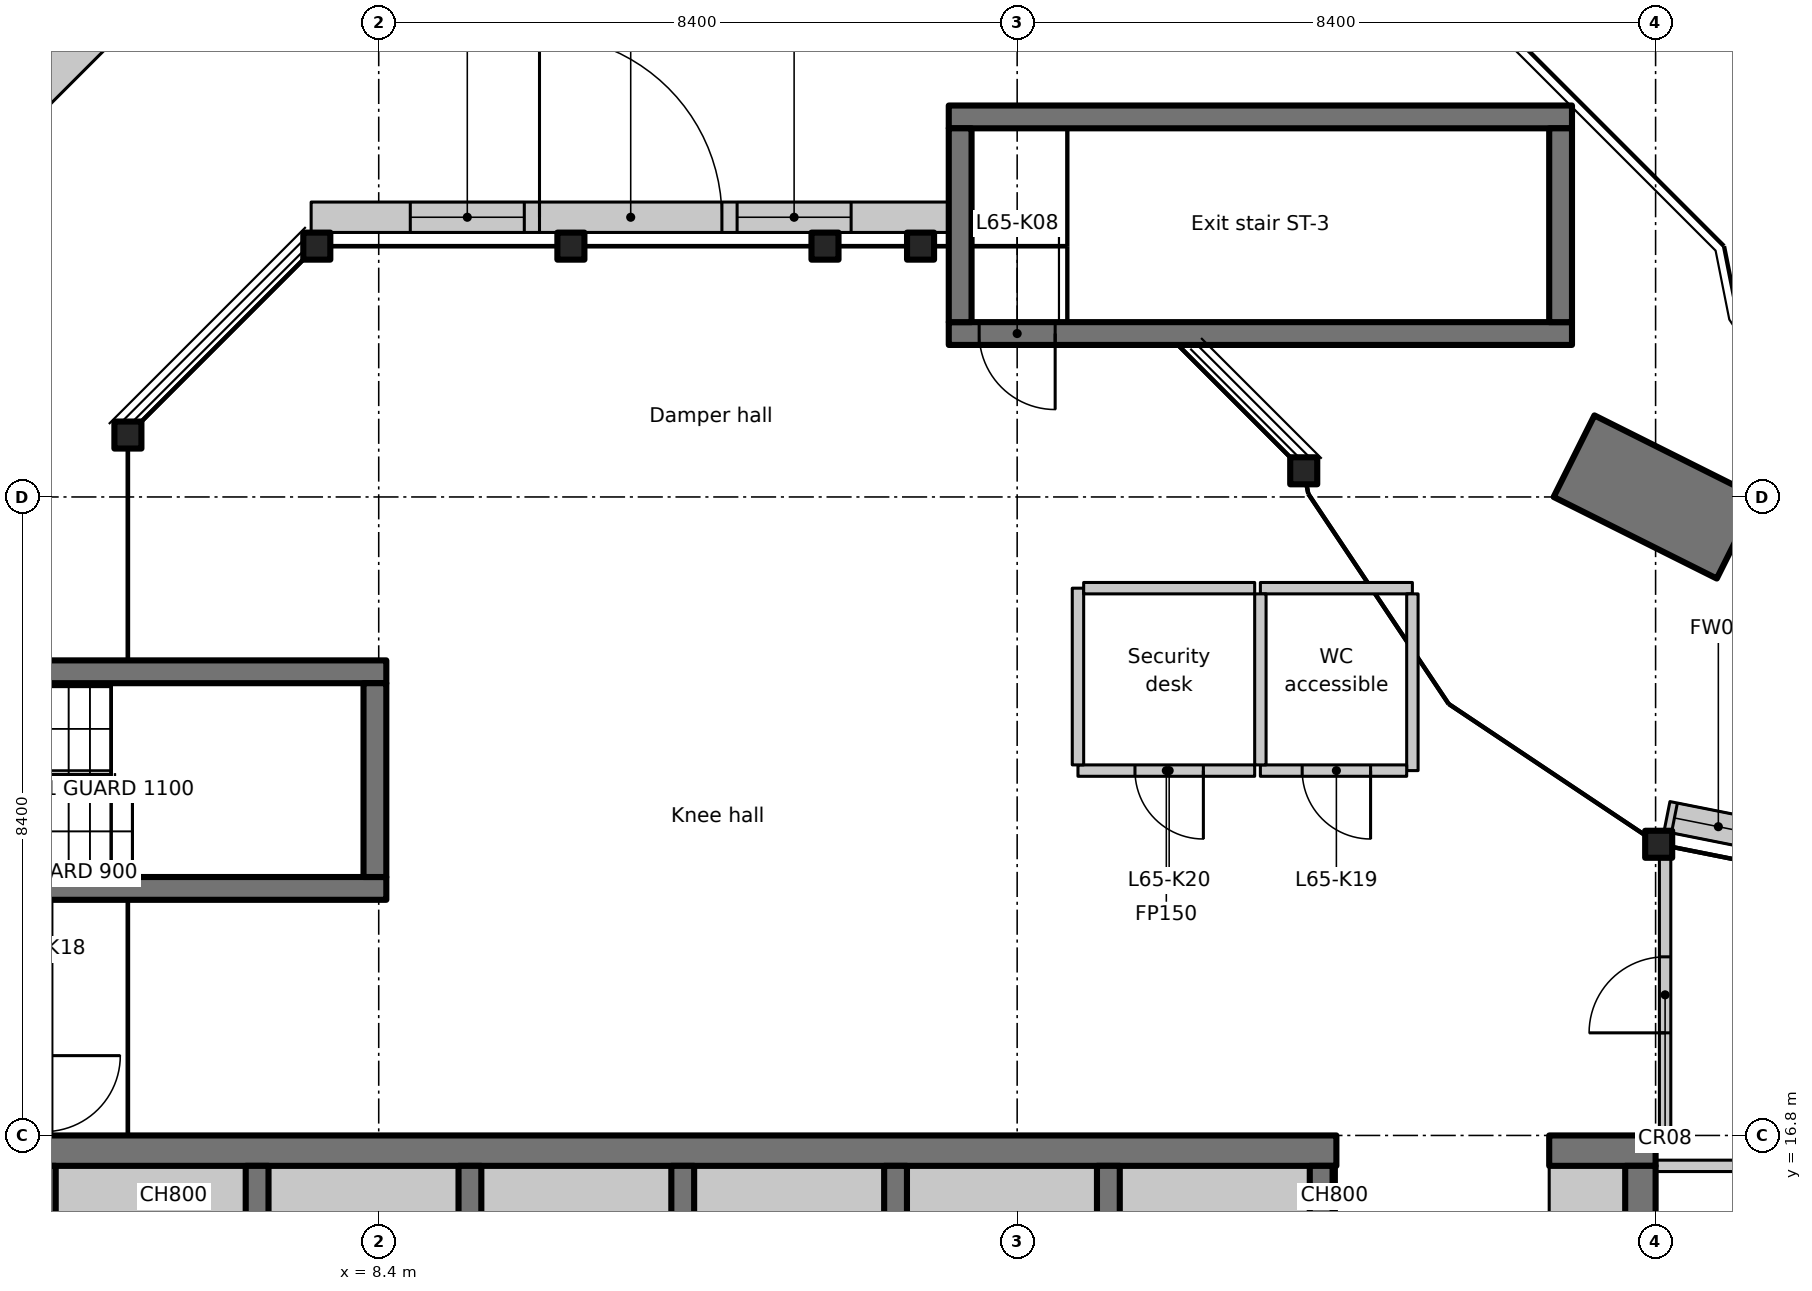
"""IFC4 building model, lengths in metres.
Left out: names, types, materials, properties, quantities, classifications, styles, units other than length and angle.
Written with IfcOpenShell. Run it as: python <this file> out.ifc"""

import sys

from ifc_helpers import new_model, si_unit, direction, frame, frame_2d, origin, origin_2d, place, context, subcontext, project, spatial, rectangle, hollow_circle, extrude, element, fill, save


model = new_model("IFC4")
c1 = context("Model", 3, precision=1e-05, world=origin(), true_north=direction((0.0, 1.0)))
c2 = subcontext(c1, "Body", "Model", "MODEL_VIEW")
j1 = project(units=[si_unit("LENGTHUNIT", "METRE"), si_unit("PLANEANGLEUNIT", "RADIAN")], contexts=[c1])
p1 = place(None, origin())
s1 = spatial("IfcSite", under=j1, at=p1, CompositionType="ELEMENT")
p2 = place(p1, origin())
s2 = spatial("IfcBuilding", under=s1, at=p2, CompositionType="ELEMENT")
p3 = place(p2, frame((0.0, 0.0, 256.2)))
s3 = spatial("IfcBuildingStorey", under=s2, at=p3, CompositionType="ELEMENT", Elevation=256.2)
p4 = place(p3, frame((26.273, 24.663, 0.0), z_axis=(0.0, 0.0, 1.0), x_axis=(-0.894427191, 0.4472135955, 0.0)))
e1 = element("IfcWall", 1, at=p4, inside=s3, PredefinedType="SOLIDWALL", context=c2, shape_type="SweptSolid", body=[
    extrude(rectangle(XDim=2.4, YDim=1.2, at=frame_2d((1.2, 0.0))), origin(), (0.0, 0.0, 1.0), 8.0),
])
for number, where, z_axis, x_axis in (
    (2, (5.1, 26.015, 0.0), (0.0, 0.0, 1.0), (1.0, 0.0, 0.0)),
    (3, (7.585, 28.5, 0.0), (0.0, 0.0, 1.0), (1.0, 0.0, 0.0)),
    (4, (10.928, 28.5, 0.0), (0.0, 0.0, 1.0), (1.0, 0.0, 0.0)),
    (5, (14.271, 28.5, 0.0), (0.0, 0.0, 1.0), (1.0, 0.0, 0.0)),
    (6, (15.529, 28.5, 0.0), (0.0, 0.0, 1.0), (1.0, 0.0, 0.0)),
    (7, (20.57, 25.544, 0.0), (0.0, 0.0, 1.0), (1.0, 0.0, 0.0)),
    (8, (25.24, 20.631, 0.0), (0.0, 0.0, 1.0), (1.0, 0.0, 0.0)),
):
    element("IfcColumn", number, at=place(p3, frame(where, z_axis=z_axis, x_axis=x_axis)), inside=s3, PredefinedType="COLUMN", context=c2, shape_type="SweptSolid", body=[
        extrude(hollow_circle(Radius=0.178, WallThickness=0.012, at=origin_2d()), origin(), (0.0, 0.0, 1.0), 7.7),
    ])
p5 = place(p3, frame((-1.1, 16.6, 0.0), z_axis=(0.0, 0.0, 1.0), x_axis=(1.0, 0.0, 0.0)))
e9 = element("IfcWall", 9, at=p5, inside=s3, PredefinedType="SHEAR", context=c2, shape_type="SweptSolid", body=[
    extrude(rectangle(XDim=22.1, YDim=0.4, at=frame_2d((11.05, 0.0))), origin(), (0.0, 0.0, 1.0), 7.7),
])
p6 = place(p5, frame((3.15, 0.0, 0.0)))
e10 = element("IfcOpeningElement", 10, at=p6, cuts=e9, PredefinedType="OPENING", context=c2, shape_type="SweptSolid", body=[
    extrude(rectangle(XDim=1.1, YDim=2.3, at=frame_2d((0.55, 1.15))), frame((0.0, 0.21, 0.0), z_axis=(0.0, -1.0, 0.0), x_axis=(1.0, 0.0, 0.0)), (0.0, 0.0, 1.0), 0.42),
])
p7 = place(p3, frame((23.8, 16.6, 0.0), z_axis=(0.0, 0.0, 1.0), x_axis=(1.0, 0.0, 0.0)))
e11 = element("IfcWall", 11, at=p7, inside=s3, PredefinedType="SHEAR", context=c2, shape_type="SweptSolid", body=[
    extrude(rectangle(XDim=1.4, YDim=0.4, at=frame_2d((0.7, 0.0))), origin(), (0.0, 0.0, 1.0), 7.7),
])
p8 = place(p3, frame((25.0, 12.6, 0.0), z_axis=(0.0, 0.0, 1.0), x_axis=(0.0, 1.0, 0.0)))
e12 = element("IfcWall", 12, at=p8, inside=s3, PredefinedType="SHEAR", context=c2, shape_type="SweptSolid", body=[
    extrude(rectangle(XDim=3.8, YDim=0.4, at=frame_2d((1.9, 0.0))), origin(), (0.0, 0.0, 1.0), 7.7),
])
p9 = place(p3, frame((23.8, 16.0, 0.0), z_axis=(0.0, 0.0, 1.0), x_axis=(1.0, 0.0, 0.0)))
e13 = element("IfcWall", 13, at=p9, inside=s3, PredefinedType="PARTITIONING", context=c2, shape_type="SweptSolid", body=[
    extrude(rectangle(XDim=1.0, YDim=0.8, at=frame_2d((0.5, 0.0))), origin(), (0.0, 0.0, 1.0), 7.7),
])
for number, where, z_axis, x_axis in (
    (14, (4.0, 12.95, 0.0), (0.0, 0.0, 1.0), (0.0, 1.0, 0.0)),
    (15, (6.8, 12.95, 0.0), (0.0, 0.0, 1.0), (0.0, 1.0, 0.0)),
    (16, (9.6, 12.95, 0.0), (0.0, 0.0, 1.0), (0.0, 1.0, 0.0)),
    (17, (12.4, 12.95, 0.0), (0.0, 0.0, 1.0), (0.0, 1.0, 0.0)),
    (18, (15.2, 12.95, 0.0), (0.0, 0.0, 1.0), (0.0, 1.0, 0.0)),
    (19, (18.0, 12.95, 0.0), (0.0, 0.0, 1.0), (0.0, 1.0, 0.0)),
    (20, (20.8, 12.95, 0.0), (0.0, 0.0, 1.0), (0.0, 1.0, 0.0)),
):
    element("IfcWall", number, at=place(p3, frame(where, z_axis=z_axis, x_axis=x_axis)), inside=s3, PredefinedType="SHEAR", context=c2, shape_type="SweptSolid", body=[
        extrude(rectangle(XDim=3.45, YDim=0.3, at=frame_2d((1.725, 0.0))), origin(), (0.0, 0.0, 1.0), 7.7),
    ])
p10 = place(p3, frame((8.5, 20.05, 0.0), z_axis=(0.0, 0.0, 1.0), x_axis=(-1.0, 0.0, 0.0)))
e21 = element("IfcWall", 21, at=p10, inside=s3, PredefinedType="SHEAR", context=c2, shape_type="SweptSolid", body=[
    extrude(rectangle(XDim=8.2, YDim=0.3, at=frame_2d((4.1, 0.0))), origin(), (0.0, 0.0, 1.0), 7.7),
])
p11 = place(p10, frame((6.8, 0.0, 0.0)))
e22 = element("IfcOpeningElement", 22, at=p11, cuts=e21, PredefinedType="OPENING", context=c2, shape_type="SweptSolid", body=[
    extrude(rectangle(XDim=1.0, YDim=2.1, at=frame_2d((0.5, 1.05))), frame((0.0, 0.16, 0.0), z_axis=(0.0, -1.0, 0.0), x_axis=(1.0, 0.0, 0.0)), (0.0, 0.0, 1.0), 0.32),
])
p12 = place(p3, frame((0.3, 22.9, 0.0), z_axis=(0.0, 0.0, 1.0), x_axis=(1.0, 0.0, 0.0)))
e23 = element("IfcWall", 23, at=p12, inside=s3, PredefinedType="SHEAR", context=c2, shape_type="SweptSolid", body=[
    extrude(rectangle(XDim=8.2, YDim=0.3, at=frame_2d((4.1, 0.0))), origin(), (0.0, 0.0, 1.0), 7.7),
])
p13 = place(p12, frame((0.4, 0.0, 0.0)))
e24 = element("IfcOpeningElement", 24, at=p13, cuts=e23, PredefinedType="OPENING", context=c2, shape_type="SweptSolid", body=[
    extrude(rectangle(XDim=1.0, YDim=2.1, at=frame_2d((0.5, 1.05))), frame((0.0, 0.16, 0.0), z_axis=(0.0, -1.0, 0.0), x_axis=(1.0, 0.0, 0.0)), (0.0, 0.0, 1.0), 0.32),
])
p14 = place(p3, frame((8.35, 20.2, 0.0), z_axis=(0.0, 0.0, 1.0), x_axis=(0.0, 1.0, 0.0)))
e25 = element("IfcWall", 25, at=p14, inside=s3, PredefinedType="SHEAR", context=c2, shape_type="SweptSolid", body=[
    extrude(rectangle(XDim=2.55, YDim=0.3, at=frame_2d((1.275, 0.0))), origin(), (0.0, 0.0, 1.0), 7.7),
])
p15 = place(p3, frame((24.1, 27.35, 0.0), z_axis=(0.0, 0.0, 1.0), x_axis=(-1.0, 0.0, 0.0)))
e26 = element("IfcWall", 26, at=p15, inside=s3, PredefinedType="SHEAR", context=c2, shape_type="SweptSolid", body=[
    extrude(rectangle(XDim=8.2, YDim=0.3, at=frame_2d((4.1, 0.0))), origin(), (0.0, 0.0, 1.0), 3.2),
])
p16 = place(p15, frame((6.8, 0.0, 0.0)))
e27 = element("IfcOpeningElement", 27, at=p16, cuts=e26, PredefinedType="OPENING", context=c2, shape_type="SweptSolid", body=[
    extrude(rectangle(XDim=1.0, YDim=2.1, at=frame_2d((0.5, 1.05))), frame((0.0, 0.16, 0.0), z_axis=(0.0, -1.0, 0.0), x_axis=(1.0, 0.0, 0.0)), (0.0, 0.0, 1.0), 0.32),
])
p17 = place(p3, frame((15.9, 30.2, 0.0), z_axis=(0.0, 0.0, 1.0), x_axis=(1.0, 0.0, 0.0)))
e28 = element("IfcWall", 28, at=p17, inside=s3, PredefinedType="SHEAR", context=c2, shape_type="SweptSolid", body=[
    extrude(rectangle(XDim=8.2, YDim=0.3, at=frame_2d((4.1, 0.0))), origin(), (0.0, 0.0, 1.0), 3.2),
])
for number, where, z_axis, x_axis in (
    (29, (16.05, 27.5, 0.0), (0.0, 0.0, 1.0), (0.0, 1.0, 0.0)),
    (30, (23.95, 27.5, 0.0), (0.0, 0.0, 1.0), (0.0, 1.0, 0.0)),
):
    element("IfcWall", number, at=place(p3, frame(where, z_axis=z_axis, x_axis=x_axis)), inside=s3, PredefinedType="SHEAR", context=c2, shape_type="SweptSolid", body=[
        extrude(rectangle(XDim=2.55, YDim=0.3, at=frame_2d((1.275, 0.0))), origin(), (0.0, 0.0, 1.0), 3.2),
    ])
p18 = place(p3, frame((20.0, 24.0, 0.0), z_axis=(0.0, 0.0, 1.0), x_axis=(1.0, 0.0, 0.0)))
e31 = element("IfcWall", 31, at=p18, inside=s3, PredefinedType="PARTITIONING", context=c2, shape_type="SweptSolid", body=[
    extrude(rectangle(XDim=2.0, YDim=0.15, at=frame_2d((1.0, 0.0))), origin(), (0.0, 0.0, 1.0), 7.7),
])
p19 = place(p3, frame((22.0, 23.925, 0.0), z_axis=(0.0, 0.0, 1.0), x_axis=(0.0, -1.0, 0.0)))
e32 = element("IfcWall", 32, at=p19, inside=s3, PredefinedType="PARTITIONING", context=c2, shape_type="SweptSolid", body=[
    extrude(rectangle(XDim=2.325, YDim=0.15, at=frame_2d((1.163, 0.0))), origin(), (0.0, 0.0, 1.0), 7.7),
])
p20 = place(p3, frame((21.925, 21.6, 0.0), z_axis=(0.0, 0.0, 1.0), x_axis=(-1.0, 0.0, 0.0)))
e33 = element("IfcWall", 33, at=p20, inside=s3, PredefinedType="PARTITIONING", context=c2, shape_type="SweptSolid", body=[
    extrude(rectangle(XDim=1.925, YDim=0.15, at=frame_2d((0.962, 0.0))), origin(), (0.0, 0.0, 1.0), 7.7),
])
p21 = place(p20, frame((0.475, 0.0, 0.0)))
e34 = element("IfcOpeningElement", 34, at=p21, cuts=e33, PredefinedType="OPENING", context=c2, shape_type="SweptSolid", body=[
    extrude(rectangle(XDim=0.9, YDim=2.1, at=frame_2d((0.45, 1.05))), frame((0.0, 0.085, 0.0), z_axis=(0.0, -1.0, 0.0), x_axis=(1.0, 0.0, 0.0)), (0.0, 0.0, 1.0), 0.17),
])
p22 = place(p3, frame((20.0, 21.675, 0.0), z_axis=(0.0, 0.0, 1.0), x_axis=(0.0, 1.0, 0.0)))
e35 = element("IfcWall", 35, at=p22, inside=s3, PredefinedType="PARTITIONING", context=c2, shape_type="SweptSolid", body=[
    extrude(rectangle(XDim=2.25, YDim=0.15, at=frame_2d((1.125, 0.0))), origin(), (0.0, 0.0, 1.0), 7.7),
])
p23 = place(p3, frame((19.925, 21.6, 0.0), z_axis=(0.0, 0.0, 1.0), x_axis=(-1.0, 0.0, 0.0)))
e36 = element("IfcWall", 36, at=p23, inside=s3, PredefinedType="PARTITIONING", context=c2, shape_type="SweptSolid", body=[
    extrude(rectangle(XDim=2.325, YDim=0.15, at=frame_2d((1.163, 0.0))), origin(), (0.0, 0.0, 1.0), 7.7),
])
p24 = place(p23, frame((0.675, 0.0, 0.0)))
e37 = element("IfcOpeningElement", 37, at=p24, cuts=e36, PredefinedType="OPENING", context=c2, shape_type="SweptSolid", body=[
    extrude(rectangle(XDim=0.9, YDim=2.1, at=frame_2d((0.45, 1.05))), frame((0.0, 0.085, 0.0), z_axis=(0.0, -1.0, 0.0), x_axis=(1.0, 0.0, 0.0)), (0.0, 0.0, 1.0), 0.17),
])
p25 = place(p3, frame((17.6, 21.675, 0.0), z_axis=(0.0, 0.0, 1.0), x_axis=(0.0, 1.0, 0.0)))
e38 = element("IfcWall", 38, at=p25, inside=s3, PredefinedType="PARTITIONING", context=c2, shape_type="SweptSolid", body=[
    extrude(rectangle(XDim=2.325, YDim=0.15, at=frame_2d((1.163, 0.0))), origin(), (0.0, 0.0, 1.0), 7.7),
])
p26 = place(p3, frame((17.675, 24.0, 0.0), z_axis=(0.0, 0.0, 1.0), x_axis=(1.0, 0.0, 0.0)))
e39 = element("IfcWall", 39, at=p26, inside=s3, PredefinedType="PARTITIONING", context=c2, shape_type="SweptSolid", body=[
    extrude(rectangle(XDim=2.25, YDim=0.15, at=frame_2d((1.125, 0.0))), origin(), (0.0, 0.0, 1.0), 7.7),
])
for number, where, z_axis, x_axis in (
    (40, (4.15, 16.0, 0.0), (0.0, 0.0, 1.0), (1.0, 0.0, 0.0)),
    (41, (6.95, 16.0, 0.0), (0.0, 0.0, 1.0), (1.0, 0.0, 0.0)),
    (42, (9.75, 16.0, 0.0), (0.0, 0.0, 1.0), (1.0, 0.0, 0.0)),
    (43, (12.55, 16.0, 0.0), (0.0, 0.0, 1.0), (1.0, 0.0, 0.0)),
    (44, (15.35, 16.0, 0.0), (0.0, 0.0, 1.0), (1.0, 0.0, 0.0)),
    (45, (18.15, 16.0, 0.0), (0.0, 0.0, 1.0), (1.0, 0.0, 0.0)),
):
    element("IfcWall", number, at=place(p3, frame(where, z_axis=z_axis, x_axis=x_axis)), inside=s3, PredefinedType="PARTITIONING", context=c2, shape_type="SweptSolid", body=[
        extrude(rectangle(XDim=2.5, YDim=0.8, at=frame_2d((1.25, 0.0))), origin(), (0.0, 0.0, 1.0), 7.7),
    ])
p27 = place(p3, frame((20.95, 16.0, 0.0), z_axis=(0.0, 0.0, 1.0), x_axis=(1.0, 0.0, 0.0)))
e46 = element("IfcWall", 46, at=p27, inside=s3, PredefinedType="PARTITIONING", context=c2, shape_type="SweptSolid", body=[
    extrude(rectangle(XDim=0.05, YDim=0.8, at=frame_2d((0.025, 0.0))), origin(), (0.0, 0.0, 1.0), 7.7),
])
p28 = place(p3, frame((25.35, 20.997, 0.0), z_axis=(0.0, 0.0, 1.0), x_axis=(0.980785257804, -0.195090435628, 0.0)))
e47 = element("IfcWall", 47, at=p28, inside=s3, PredefinedType="SOLIDWALL", context=c2, shape_type="SweptSolid", body=[
    extrude(rectangle(XDim=5.356, YDim=0.4, at=frame_2d((2.678, 0.0))), origin(), (0.0, 0.0, 1.0), 7.7),
])
p29 = place(p28, frame((1.478, 0.0, 0.0)))
e48 = element("IfcOpeningElement", 48, at=p29, cuts=e47, PredefinedType="OPENING", context=c2, shape_type="SweptSolid", body=[
    extrude(rectangle(XDim=2.4, YDim=2.7, at=frame_2d((1.2, 1.35))), frame((0.0, 0.21, 0.0), z_axis=(0.0, -1.0, 0.0), x_axis=(1.0, 0.0, 0.0)), (0.0, 0.0, 1.0), 0.42),
])
p30 = place(p28, frame((0.1, 0.0, 0.0)))
e49 = element("IfcOpeningElement", 49, at=p30, cuts=e47, PredefinedType="OPENING", context=c2, shape_type="SweptSolid", body=[
    extrude(rectangle(XDim=1.178, YDim=2.8, at=frame_2d((0.589, 1.4))), frame((0.0, 0.21, 0.0), z_axis=(0.0, -1.0, 0.0), x_axis=(1.0, 0.0, 0.0)), (0.0, 0.0, 1.0), 0.42),
])
p31 = place(p28, frame((4.078, 0.0, 0.0)))
e50 = element("IfcOpeningElement", 50, at=p31, cuts=e47, PredefinedType="OPENING", context=c2, shape_type="SweptSolid", body=[
    extrude(rectangle(XDim=1.178, YDim=2.8, at=frame_2d((0.589, 1.4))), frame((0.0, 0.21, 0.0), z_axis=(0.0, -1.0, 0.0), x_axis=(1.0, 0.0, 0.0)), (0.0, 0.0, 1.0), 0.42),
])
p32 = place(p3, frame((7.511, 28.88, 0.0), z_axis=(0.0, 0.0, 1.0), x_axis=(1.0, 0.0, 0.0)))
e51 = element("IfcWall", 51, at=p32, inside=s3, PredefinedType="SOLIDWALL", context=c2, shape_type="SweptSolid", body=[
    extrude(rectangle(XDim=8.409, YDim=0.4, at=frame_2d((4.205, 0.0))), origin(), (0.0, 0.0, 1.0), 7.7),
])
p33 = place(p32, frame((3.005, 0.0, 0.0)))
e52 = element("IfcOpeningElement", 52, at=p33, cuts=e51, PredefinedType="OPENING", context=c2, shape_type="SweptSolid", body=[
    extrude(rectangle(XDim=2.4, YDim=2.7, at=frame_2d((1.2, 1.35))), frame((0.0, 0.21, 0.0), z_axis=(0.0, -1.0, 0.0), x_axis=(1.0, 0.0, 0.0)), (0.0, 0.0, 1.0), 0.42),
])
p34 = place(p32, frame((1.305, 0.0, 0.0)))
e53 = element("IfcOpeningElement", 53, at=p34, cuts=e51, PredefinedType="OPENING", context=c2, shape_type="SweptSolid", body=[
    extrude(rectangle(XDim=1.5, YDim=2.8, at=frame_2d((0.75, 1.4))), frame((0.0, 0.21, 0.0), z_axis=(0.0, -1.0, 0.0), x_axis=(1.0, 0.0, 0.0)), (0.0, 0.0, 1.0), 0.42),
])
p35 = place(p32, frame((5.605, 0.0, 0.0)))
e54 = element("IfcOpeningElement", 54, at=p35, cuts=e51, PredefinedType="OPENING", context=c2, shape_type="SweptSolid", body=[
    extrude(rectangle(XDim=1.5, YDim=2.8, at=frame_2d((0.75, 1.4))), frame((0.0, 0.21, 0.0), z_axis=(0.0, -1.0, 0.0), x_axis=(1.0, 0.0, 0.0)), (0.0, 0.0, 1.0), 0.42),
])
p36 = place(p3, frame((25.2, 16.4, 0.0), z_axis=(0.0, 0.0, 1.0), x_axis=(1.0, 0.0, 0.0)))
e55 = element("IfcWall", 55, at=p36, inside=s3, PredefinedType="PARTITIONING", context=c2, shape_type="SweptSolid", body=[
    extrude(rectangle(XDim=4.875, YDim=0.15, at=frame_2d((2.438, 0.0))), origin(), (0.0, 0.0, 1.0), 7.7),
])
p37 = place(p3, frame((25.325, 16.6, 0.0), z_axis=(0.0, 0.0, 1.0), x_axis=(0.0, 1.0, 0.0)))
e56 = element("IfcWall", 56, at=p37, inside=s3, PredefinedType="PARTITIONING", context=c2, shape_type="SweptSolid", body=[
    extrude(rectangle(XDim=4.1, YDim=0.15, at=frame_2d((2.05, 0.0))), origin(), (0.0, 0.0, 1.0), 7.7),
])
p38 = place(p37, frame((1.55, 0.0, 0.0)))
e57 = element("IfcOpeningElement", 57, at=p38, cuts=e56, PredefinedType="OPENING", context=c2, shape_type="SweptSolid", body=[
    extrude(rectangle(XDim=1.0, YDim=2.1, at=frame_2d((0.5, 1.05))), frame((0.0, 0.085, 0.0), z_axis=(0.0, -1.0, 0.0), x_axis=(1.0, 0.0, 0.0)), (0.0, 0.0, 1.0), 0.17),
])
p39 = place(p3, frame((5.338, 32.476, 0.0), z_axis=(0.0, 0.0, 1.0), x_axis=(-0.707106781187, -0.707106781187, 0.0)))
e58 = element("IfcWall", 58, at=p39, inside=s3, PredefinedType="PARAPET", context=c2, shape_type="SweptSolid", body=[
    extrude(rectangle(XDim=5.325, YDim=1.2, at=frame_2d((2.663, 0.0))), origin(), (0.0, 0.0, 1.0), 1.3),
])
p40 = place(p16, origin())
e59 = element("IfcDoor", 59, at=p40, inside=s3, OperationType="SINGLE_SWING_LEFT", PredefinedType="DOOR", context=c2, shape_type="SweptSolid", body=[
    extrude(rectangle(XDim=1.0, YDim=2.1, at=frame_2d((0.5, 1.05))), frame((0.0, 0.025, 0.0), z_axis=(0.0, -1.0, 0.0), x_axis=(1.0, 0.0, 0.0)), (0.0, 0.0, 1.0), 0.05),
])
fill(e27, e59)
p41 = place(p21, origin())
e60 = element("IfcDoor", 60, at=p41, inside=s3, OperationType="SINGLE_SWING_RIGHT", PredefinedType="DOOR", context=c2, shape_type="SweptSolid", body=[
    extrude(rectangle(XDim=0.9, YDim=2.1, at=frame_2d((0.45, 1.05))), frame((0.0, 0.025, 0.0), z_axis=(0.0, -1.0, 0.0), x_axis=(1.0, 0.0, 0.0)), (0.0, 0.0, 1.0), 0.05),
])
fill(e34, e60)
p42 = place(p24, origin())
e61 = element("IfcDoor", 61, at=p42, inside=s3, OperationType="SINGLE_SWING_LEFT", PredefinedType="DOOR", context=c2, shape_type="SweptSolid", body=[
    extrude(rectangle(XDim=0.9, YDim=2.1, at=frame_2d((0.45, 1.05))), frame((0.0, 0.025, 0.0), z_axis=(0.0, -1.0, 0.0), x_axis=(1.0, 0.0, 0.0)), (0.0, 0.0, 1.0), 0.05),
])
fill(e37, e61)
p43 = place(p30, origin())
e62 = element("IfcWindow", 62, at=p43, inside=s3, PartitioningType="SINGLE_PANEL", PredefinedType="WINDOW", context=c2, shape_type="SweptSolid", body=[
    extrude(rectangle(XDim=1.178, YDim=2.8, at=frame_2d((0.589, 1.4))), frame((0.0, 0.03, 0.0), z_axis=(0.0, -1.0, 0.0), x_axis=(1.0, 0.0, 0.0)), (0.0, 0.0, 1.0), 0.06),
])
fill(e49, e62)
p44 = place(p33, origin())
e63 = element("IfcDoor", 63, at=p44, inside=s3, OperationType="DOUBLE_DOOR_DOUBLE_SWING", PredefinedType="DOOR", context=c2, shape_type="SweptSolid", body=[
    extrude(rectangle(XDim=2.4, YDim=2.7, at=frame_2d((1.2, 1.35))), frame((0.0, 0.025, 0.0), z_axis=(0.0, -1.0, 0.0), x_axis=(1.0, 0.0, 0.0)), (0.0, 0.0, 1.0), 0.05),
])
fill(e52, e63)
p45 = place(p34, origin())
e64 = element("IfcWindow", 64, at=p45, inside=s3, PartitioningType="SINGLE_PANEL", PredefinedType="WINDOW", context=c2, shape_type="SweptSolid", body=[
    extrude(rectangle(XDim=1.5, YDim=2.8, at=frame_2d((0.75, 1.4))), frame((0.0, 0.03, 0.0), z_axis=(0.0, -1.0, 0.0), x_axis=(1.0, 0.0, 0.0)), (0.0, 0.0, 1.0), 0.06),
])
fill(e53, e64)
p46 = place(p35, origin())
e65 = element("IfcWindow", 65, at=p46, inside=s3, PartitioningType="SINGLE_PANEL", PredefinedType="WINDOW", context=c2, shape_type="SweptSolid", body=[
    extrude(rectangle(XDim=1.5, YDim=2.8, at=frame_2d((0.75, 1.4))), frame((0.0, 0.03, 0.0), z_axis=(0.0, -1.0, 0.0), x_axis=(1.0, 0.0, 0.0)), (0.0, 0.0, 1.0), 0.06),
])
fill(e54, e65)
p47 = place(p38, origin())
e66 = element("IfcDoor", 66, at=p47, inside=s3, OperationType="SINGLE_SWING_LEFT", PredefinedType="DOOR", context=c2, shape_type="SweptSolid", body=[
    extrude(rectangle(XDim=1.0, YDim=2.1, at=frame_2d((0.5, 1.05))), frame((0.0, 0.025, 0.0), z_axis=(0.0, -1.0, 0.0), x_axis=(1.0, 0.0, 0.0)), (0.0, 0.0, 1.0), 0.05),
])
fill(e57, e66)
save(model, sys.argv[1])
